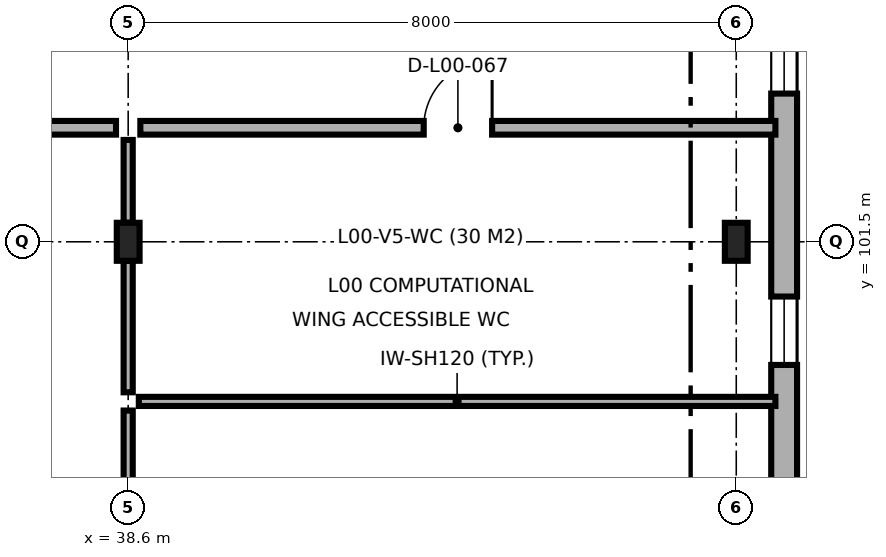
"""IFC4 building model, lengths in metres.
Left out: names, types, materials, properties, quantities, classifications, styles, units other than length and angle.
Written with IfcOpenShell. Run it as: python <this file> out.ifc"""

import sys

from ifc_helpers import new_model, si_unit, direction, frame, frame_2d, origin, origin_2d, place, context, subcontext, project, spatial, rectangle, i_section, extrude, element, fill, save


model = new_model("IFC4")
c1 = context("Model", 3, precision=1e-05, world=origin(), true_north=direction((0.0, 1.0)))
c2 = subcontext(c1, "Body", "Model", "MODEL_VIEW")
j1 = project(units=[si_unit("LENGTHUNIT", "METRE"), si_unit("PLANEANGLEUNIT", "RADIAN")], contexts=[c1])
p1 = place(None, origin())
s1 = spatial("IfcSite", under=j1, at=p1, CompositionType="ELEMENT")
p2 = place(p1, origin())
s2 = spatial("IfcBuilding", under=s1, at=p2, CompositionType="ELEMENT")
p3 = place(p2, origin())
s3 = spatial("IfcBuildingStorey", under=s2, at=p3, CompositionType="ELEMENT", Elevation=0.0)
for number, where, z_axis, x_axis in (
    (1, (38.6, 101.5, 0.0), (0.0, 0.0, 1.0), (1.0, 0.0, 0.0)),
    (2, (46.6, 101.5, 0.0), (0.0, 0.0, 1.0), (1.0, 0.0, 0.0)),
):
    element("IfcColumn", number, at=place(p3, frame(where, z_axis=z_axis, x_axis=x_axis)), inside=s3, PredefinedType="COLUMN", context=c2, shape_type="SweptSolid", body=[
        extrude(i_section(OverallWidth=0.3, OverallDepth=0.5, WebThickness=0.014, FlangeThickness=0.028, FilletRadius=0.027, at=origin_2d()), origin(), (0.0, 0.0, 1.0), 4.8),
    ])
p4 = place(p3, frame((47.23, 88.623, 0.0), z_axis=(0.0, 0.0, 1.0), x_axis=(0.0, 1.0, 0.0)))
e3 = element("IfcWall", 3, at=p4, inside=s3, PredefinedType="SOLIDWALL", context=c2, shape_type="SweptSolid", body=[
    extrude(rectangle(XDim=27.477, YDim=0.34, at=frame_2d((13.739, 0.0))), origin(), (0.0, 0.0, 1.0), 4.55),
])
p5 = place(p4, frame((1.364, 0.0, 0.9)))
e4 = element("IfcOpeningElement", 4, at=p5, cuts=e3, PredefinedType="OPENING", context=c2, shape_type="SweptSolid", body=[
    extrude(rectangle(XDim=2.25, YDim=1.95, at=frame_2d((1.125, 0.975))), frame((0.0, 0.18, 0.0), z_axis=(0.0, -1.0, 0.0), x_axis=(1.0, 0.0, 0.0)), (0.0, 0.0, 1.0), 0.36),
])
p6 = place(p4, frame((6.522, 0.0, 0.9)))
e5 = element("IfcOpeningElement", 5, at=p6, cuts=e3, PredefinedType="OPENING", context=c2, shape_type="SweptSolid", body=[
    extrude(rectangle(XDim=2.85, YDim=1.95, at=frame_2d((1.425, 0.975))), frame((0.0, 0.18, 0.0), z_axis=(0.0, -1.0, 0.0), x_axis=(1.0, 0.0, 0.0)), (0.0, 0.0, 1.0), 0.36),
])
p7 = place(p4, frame((11.257, 0.0, 0.9)))
e6 = element("IfcOpeningElement", 6, at=p7, cuts=e3, PredefinedType="OPENING", context=c2, shape_type="SweptSolid", body=[
    extrude(rectangle(XDim=0.9, YDim=1.8, at=frame_2d((0.45, 0.9))), frame((0.0, 0.18, 0.0), z_axis=(0.0, -1.0, 0.0), x_axis=(1.0, 0.0, 0.0)), (0.0, 0.0, 1.0), 0.36),
])
p8 = place(p4, frame((14.827, 0.0, 0.9)))
e7 = element("IfcOpeningElement", 7, at=p8, cuts=e3, PredefinedType="OPENING", context=c2, shape_type="SweptSolid", body=[
    extrude(rectangle(XDim=1.5, YDim=1.8, at=frame_2d((0.75, 0.9))), frame((0.0, 0.18, 0.0), z_axis=(0.0, -1.0, 0.0), x_axis=(1.0, 0.0, 0.0)), (0.0, 0.0, 1.0), 0.36),
])
p9 = place(p4, frame((17.657, 0.0, 0.9)))
e8 = element("IfcOpeningElement", 8, at=p9, cuts=e3, PredefinedType="OPENING", context=c2, shape_type="SweptSolid", body=[
    extrude(rectangle(XDim=2.1, YDim=1.8, at=frame_2d((1.05, 0.9))), frame((0.0, 0.18, 0.0), z_axis=(0.0, -1.0, 0.0), x_axis=(1.0, 0.0, 0.0)), (0.0, 0.0, 1.0), 0.36),
])
p10 = place(p4, frame((22.517, 0.0, 0.9)))
e9 = element("IfcOpeningElement", 9, at=p10, cuts=e3, PredefinedType="OPENING", context=c2, shape_type="SweptSolid", body=[
    extrude(rectangle(XDim=2.7, YDim=1.8, at=frame_2d((1.35, 0.9))), frame((0.0, 0.18, 0.0), z_axis=(0.0, -1.0, 0.0), x_axis=(1.0, 0.0, 0.0)), (0.0, 0.0, 1.0), 0.36),
])
p11 = place(p3, frame((38.74, 99.4, 0.0), z_axis=(0.0, 0.0, 1.0), x_axis=(1.0, 0.0, 0.0)))
e10 = element("IfcWall", 10, at=p11, inside=s3, PredefinedType="PARTITIONING", context=c2, shape_type="SweptSolid", body=[
    extrude(rectangle(XDim=8.375, YDim=0.12, at=frame_2d((4.188, 0.0))), origin(), (0.0, 0.0, 1.0), 4.55),
])
p12 = place(p3, frame((38.6, 93.75, 0.0), z_axis=(0.0, 0.0, 1.0), x_axis=(0.0, 1.0, 0.0)))
e11 = element("IfcWall", 11, at=p12, inside=s3, PredefinedType="PARTITIONING", context=c2, shape_type="SweptSolid", body=[
    extrude(rectangle(XDim=5.53, YDim=0.12, at=frame_2d((2.765, 0.0))), origin(), (0.0, 0.0, 1.0), 4.05),
])
p13 = place(p3, frame((38.6, 99.52, 0.0), z_axis=(0.0, 0.0, 1.0), x_axis=(0.0, 1.0, 0.0)))
e12 = element("IfcWall", 12, at=p13, inside=s3, PredefinedType="PARTITIONING", context=c2, shape_type="SweptSolid", body=[
    extrude(rectangle(XDim=1.73, YDim=0.12, at=frame_2d((0.865, 0.0))), origin(), (0.0, 0.0, 1.0), 4.05),
])
p14 = place(p3, frame((38.6, 101.75, 0.0), z_axis=(0.0, 0.0, 1.0), x_axis=(0.0, 1.0, 0.0)))
e13 = element("IfcWall", 13, at=p14, inside=s3, PredefinedType="PARTITIONING", context=c2, shape_type="SweptSolid", body=[
    extrude(rectangle(XDim=1.09, YDim=0.12, at=frame_2d((0.545, 0.0))), origin(), (0.0, 0.0, 1.0), 4.05),
])
p15 = place(p3, frame((29.16, 103.0, 0.0), z_axis=(0.0, 0.0, 1.0), x_axis=(1.0, 0.0, 0.0)))
e14 = element("IfcWall", 14, at=p15, inside=s3, PredefinedType="PARTITIONING", context=c2, shape_type="SweptSolid", body=[
    extrude(rectangle(XDim=9.28, YDim=0.18, at=frame_2d((4.64, 0.0))), origin(), (0.0, 0.0, 1.0), 4.55),
])
p16 = place(p15, frame((4.09, 0.0, 0.0)))
e15 = element("IfcOpeningElement", 15, at=p16, cuts=e14, PredefinedType="OPENING", context=c2, shape_type="SweptSolid", body=[
    extrude(rectangle(XDim=1.1, YDim=2.15, at=frame_2d((0.55, 1.075))), frame((0.0, 0.1, 0.0), z_axis=(0.0, -1.0, 0.0), x_axis=(1.0, 0.0, 0.0)), (0.0, 0.0, 1.0), 0.2),
])
p17 = place(p3, frame((38.76, 103.0, 0.0), z_axis=(0.0, 0.0, 1.0), x_axis=(1.0, 0.0, 0.0)))
e16 = element("IfcWall", 16, at=p17, inside=s3, PredefinedType="PARTITIONING", context=c2, shape_type="SweptSolid", body=[
    extrude(rectangle(XDim=8.355, YDim=0.18, at=frame_2d((4.177, 0.0))), origin(), (0.0, 0.0, 1.0), 4.55),
])
p18 = place(p17, frame((3.728, 0.0, 0.0)))
e17 = element("IfcOpeningElement", 17, at=p18, cuts=e16, PredefinedType="OPENING", context=c2, shape_type="SweptSolid", body=[
    extrude(rectangle(XDim=0.9, YDim=2.1, at=frame_2d((0.45, 1.05))), frame((0.0, 0.1, 0.0), z_axis=(0.0, -1.0, 0.0), x_axis=(1.0, 0.0, 0.0)), (0.0, 0.0, 1.0), 0.2),
])
p19 = place(p7, origin())
e18 = element("IfcWindow", 18, at=p19, inside=s3, PartitioningType="SINGLE_PANEL", PredefinedType="WINDOW", context=c2, shape_type="SweptSolid", body=[
    extrude(rectangle(XDim=0.9, YDim=1.8, at=frame_2d((0.45, 0.9))), frame((0.0, 0.03, 0.0), z_axis=(0.0, -1.0, 0.0), x_axis=(1.0, 0.0, 0.0)), (0.0, 0.0, 1.0), 0.06),
])
fill(e6, e18)
p20 = place(p8, origin())
e19 = element("IfcWindow", 19, at=p20, inside=s3, PartitioningType="SINGLE_PANEL", PredefinedType="WINDOW", context=c2, shape_type="SweptSolid", body=[
    extrude(rectangle(XDim=1.5, YDim=1.8, at=frame_2d((0.75, 0.9))), frame((0.0, 0.03, 0.0), z_axis=(0.0, -1.0, 0.0), x_axis=(1.0, 0.0, 0.0)), (0.0, 0.0, 1.0), 0.06),
])
fill(e7, e19)
p21 = place(p18, origin())
e20 = element("IfcDoor", 20, at=p21, inside=s3, OperationType="SINGLE_SWING_RIGHT", PredefinedType="DOOR", context=c2, shape_type="SweptSolid", body=[
    extrude(rectangle(XDim=0.9, YDim=2.1, at=frame_2d((0.45, 1.05))), frame((0.0, 0.025, 0.0), z_axis=(0.0, -1.0, 0.0), x_axis=(1.0, 0.0, 0.0)), (0.0, 0.0, 1.0), 0.05),
])
fill(e17, e20)
save(model, sys.argv[1])
